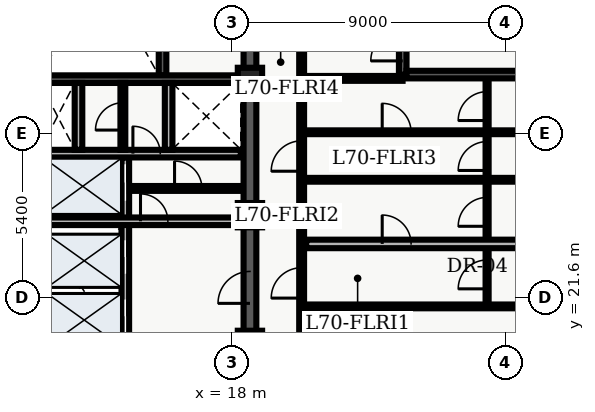
"""IFC4 building model, lengths in metres.
Left out: names, types, materials, properties, quantities, classifications, styles, units other than length and angle.
Written with IfcOpenShell. Run it as: python <this file> out.ifc"""

import sys

from ifc_helpers import new_model, entity, si_unit, converted_unit, direction, frame, origin_with_axes, origin_2d_with_axis, place, context, subcontext, project, spatial, polyline, rectangle, outline, extrude, element, fill, save


model = new_model("IFC4")
c1 = context("Model", 3, precision=1e-05, world=origin_with_axes(), true_north=direction((0.0, 1.0)))
c2 = subcontext(c1, "Body", "Model", "MODEL_VIEW")
j1 = project(units=[si_unit("LENGTHUNIT", "METRE"), converted_unit("PLANEANGLEUNIT", "DEGREE", entity("IfcPlaneAngleMeasure", 0.017), si_unit("PLANEANGLEUNIT", "RADIAN"), dimensions=[0, 0, 0, 0, 0, 0, 0])], contexts=[c1])
p1 = place(None, origin_with_axes())
s1 = spatial("IfcSite", under=j1, at=p1, CompositionType="ELEMENT")
p2 = place(p1, origin_with_axes())
s2 = spatial("IfcBuilding", under=s1, at=p2, CompositionType="ELEMENT")
p3 = place(p2, frame((0.0, 0.0, 284.1), z_axis=(0.0, 0.0, 1.0), x_axis=(1.0, 0.0, 0.0)))
s3 = spatial("IfcBuildingStorey", under=s2, at=p3, CompositionType="ELEMENT", Elevation=284.1)
p4 = place(p3, frame((18.6, 10.8, 0.0), z_axis=(0.0, 0.0, 1.0), x_axis=(0.0, 1.0, 0.0)))
e1 = element("IfcWall", 1, at=p4, inside=s3, PredefinedType="SHEAR", context=c2, shape_type="SweptSolid", body=[
    extrude(outline(polyline([(0.0, -0.21), (13.5, -0.21), (13.5, 0.21), (0.0, 0.21), (0.0, -0.21)])), origin_with_axes(), (0.0, 0.0, 1.0), 3.6),
])
p5 = place(p4, frame((1.3, 0.0, 0.0), z_axis=(0.0, 0.0, 1.0), x_axis=(1.0, 0.0, 0.0)))
e2 = element("IfcOpeningElement", 2, at=p5, cuts=e1, PredefinedType="OPENING", context=c2, shape_type="SweptSolid", body=[
    extrude(rectangle(XDim=1.1, YDim=0.44, at=origin_2d_with_axis()), origin_with_axes(), (0.0, 0.0, 1.0), 2.15),
])
p6 = place(p4, frame((3.4, 0.0, 0.0), z_axis=(0.0, 0.0, 1.0), x_axis=(1.0, 0.0, 0.0)))
e3 = element("IfcOpeningElement", 3, at=p6, cuts=e1, PredefinedType="OPENING", context=c2, shape_type="SweptSolid", body=[
    extrude(rectangle(XDim=1.1, YDim=0.44, at=origin_2d_with_axis()), origin_with_axes(), (0.0, 0.0, 1.0), 2.15),
])
p7 = place(p4, frame((11.125, 0.0, 0.0), z_axis=(0.0, 0.0, 1.0), x_axis=(1.0, 0.0, 0.0)))
e4 = element("IfcOpeningElement", 4, at=p7, cuts=e1, PredefinedType="OPENING", context=c2, shape_type="SweptSolid", body=[
    extrude(rectangle(XDim=1.05, YDim=0.44, at=origin_2d_with_axis()), origin_with_axes(), (0.0, 0.0, 1.0), 2.15),
])
p8 = place(p4, frame((6.675, 0.0, 0.0), z_axis=(0.0, 0.0, 1.0), x_axis=(1.0, 0.0, 0.0)))
e5 = element("IfcOpeningElement", 5, at=p8, cuts=e1, PredefinedType="OPENING", context=c2, shape_type="SweptSolid", body=[
    extrude(rectangle(XDim=0.95, YDim=0.44, at=origin_2d_with_axis()), origin_with_axes(), (0.0, 0.0, 1.0), 2.15),
])
p9 = place(p3, frame((18.6, 24.3, 0.0), z_axis=(0.0, 0.0, 1.0), x_axis=(0.0, 1.0, 0.0)))
e6 = element("IfcWall", 6, at=p9, inside=s3, PredefinedType="SHEAR", context=c2, shape_type="SweptSolid", body=[
    extrude(outline(polyline([(0.0, -0.21), (13.5, -0.21), (13.5, 0.21), (0.0, 0.21), (0.0, -0.21)])), origin_with_axes(), (0.0, 0.0, 1.0), 3.6),
])
p10 = place(p9, frame((6.725, 0.0, 0.0), z_axis=(0.0, 0.0, 1.0), x_axis=(1.0, 0.0, 0.0)))
e7 = element("IfcOpeningElement", 7, at=p10, cuts=e6, PredefinedType="OPENING", context=c2, shape_type="SweptSolid", body=[
    extrude(rectangle(XDim=1.05, YDim=0.44, at=origin_2d_with_axis()), origin_with_axes(), (0.0, 0.0, 1.0), 2.15),
])
p11 = place(p9, frame((11.125, 0.0, 0.0), z_axis=(0.0, 0.0, 1.0), x_axis=(1.0, 0.0, 0.0)))
e8 = element("IfcOpeningElement", 8, at=p11, cuts=e6, PredefinedType="OPENING", context=c2, shape_type="SweptSolid", body=[
    extrude(rectangle(XDim=1.05, YDim=0.44, at=origin_2d_with_axis()), origin_with_axes(), (0.0, 0.0, 1.0), 2.15),
])
p12 = place(p3, frame((15.725, 28.9, 0.0), z_axis=(0.0, 0.0, 1.0), x_axis=(0.0, 1.0, 0.0)))
e9 = element("IfcWall", 9, at=p12, inside=s3, PredefinedType="SHEAR", context=c2, shape_type="SweptSolid", body=[
    extrude(outline(polyline([(0.0, -0.125), (8.69, -0.125), (8.69, 0.125), (0.0, 0.125), (0.0, -0.125)])), origin_with_axes(), (0.0, 0.0, 1.0), 3.6),
])
p13 = place(p3, frame((11.61, 28.775, 0.0), z_axis=(0.0, 0.0, 1.0), x_axis=(1.0, 0.0, 0.0)))
e10 = element("IfcWall", 10, at=p13, inside=s3, PredefinedType="SHEAR", context=c2, shape_type="SweptSolid", body=[
    extrude(outline(polyline([(0.0, -0.125), (6.78, -0.125), (6.78, 0.125), (0.0, 0.125), (0.0, -0.125)])), origin_with_axes(), (0.0, 0.0, 1.0), 3.6),
])
p14 = place(p3, frame((14.5, 19.95, 0.0), z_axis=(0.0, 0.0, 1.0), x_axis=(0.0, 1.0, 0.0)))
e11 = element("IfcWall", 11, at=p14, inside=s3, PredefinedType="SOLIDWALL", context=c2, shape_type="SweptSolid", body=[
    extrude(outline(polyline([(0.0, -0.125), (6.25, -0.125), (6.25, 0.125), (0.0, 0.125), (0.0, -0.125)])), origin_with_axes(), (0.0, 0.0, 1.0), 2.64),
])
p15 = place(p14, frame((1.025, 0.0, 0.0), z_axis=(0.0, 0.0, 1.0), x_axis=(1.0, 0.0, 0.0)))
e12 = element("IfcOpeningElement", 12, at=p15, cuts=e11, PredefinedType="OPENING", context=c2, shape_type="SweptSolid", body=[
    extrude(rectangle(XDim=1.1, YDim=0.27, at=origin_2d_with_axis()), origin_with_axes(), (0.0, 0.0, 1.0), 2.15),
])
p16 = place(p14, frame((2.975, 0.0, 0.0), z_axis=(0.0, 0.0, 1.0), x_axis=(1.0, 0.0, 0.0)))
e13 = element("IfcOpeningElement", 13, at=p16, cuts=e11, PredefinedType="OPENING", context=c2, shape_type="SweptSolid", body=[
    extrude(rectangle(XDim=1.1, YDim=0.27, at=origin_2d_with_axis()), origin_with_axes(), (0.0, 0.0, 1.0), 2.15),
])
p17 = place(p14, frame((5.425, 0.0, 0.0), z_axis=(0.0, 0.0, 1.0), x_axis=(1.0, 0.0, 0.0)))
e14 = element("IfcOpeningElement", 14, at=p17, cuts=e11, PredefinedType="OPENING", context=c2, shape_type="SweptSolid", body=[
    extrude(rectangle(XDim=1.2, YDim=0.27, at=origin_2d_with_axis()), origin_with_axes(), (0.0, 0.0, 1.0), 2.15),
])
p18 = place(p3, frame((11.7, 24.1, 0.0), z_axis=(0.0, 0.0, 1.0), x_axis=(1.0, 0.0, 0.0)))
e15 = element("IfcWall", 15, at=p18, inside=s3, PredefinedType="SOLIDWALL", context=c2, shape_type="SweptSolid", body=[
    extrude(outline(polyline([(0.0, -0.125), (6.6, -0.125), (6.6, 0.125), (0.0, 0.125), (0.0, -0.125)])), origin_with_axes(), (0.0, 0.0, 1.0), 2.64),
])
p19 = place(p18, frame((3.75, 0.0, 0.0), z_axis=(0.0, 0.0, 1.0), x_axis=(1.0, 0.0, 0.0)))
e16 = element("IfcOpeningElement", 16, at=p19, cuts=e15, PredefinedType="OPENING", context=c2, shape_type="SweptSolid", body=[
    extrude(rectangle(XDim=0.9, YDim=0.27, at=origin_2d_with_axis()), origin_with_axes(), (0.0, 0.0, 1.0), 2.15),
])
p20 = place(p3, frame((11.7, 26.325, 0.0), z_axis=(0.0, 0.0, 1.0), x_axis=(1.0, 0.0, 0.0)))
e17 = element("IfcWall", 17, at=p20, inside=s3, PredefinedType="SOLIDWALL", context=c2, shape_type="SweptSolid", body=[
    extrude(outline(polyline([(0.0, -0.125), (6.6, -0.125), (6.6, 0.125), (0.0, 0.125), (0.0, -0.125)])), origin_with_axes(), (0.0, 0.0, 1.0), 2.64),
])
p21 = place(p20, frame((3.5, 0.0, 0.0), z_axis=(0.0, 0.0, 1.0), x_axis=(1.0, 0.0, 0.0)))
e18 = element("IfcOpeningElement", 18, at=p21, cuts=e17, PredefinedType="OPENING", context=c2, shape_type="SweptSolid", body=[
    extrude(rectangle(XDim=0.9, YDim=0.27, at=origin_2d_with_axis()), origin_with_axes(), (0.0, 0.0, 1.0), 2.15),
])
for number, where, z_axis, x_axis in (
    (19, (12.96, 26.45, 0.0), (0.0, 0.0, 1.0), (0.0, 1.0, 0.0)),
    (20, (15.925, 26.45, 0.0), (0.0, 0.0, 1.0), (0.0, 1.0, 0.0)),
):
    element("IfcWall", number, at=place(p3, frame(where, z_axis=z_axis, x_axis=x_axis)), inside=s3, PredefinedType="SOLIDWALL", context=c2, shape_type="SweptSolid", body=[
        extrude(outline(polyline([(0.0, -0.125), (2.2, -0.125), (2.2, 0.125), (0.0, 0.125), (0.0, -0.125)])), origin_with_axes(), (0.0, 0.0, 1.0), 2.64),
    ])
p22 = place(p3, frame((23.625, 28.925, 0.0), z_axis=(0.0, 0.0, 1.0), x_axis=(0.0, 1.0, 0.0)))
e21 = element("IfcWall", 21, at=p22, inside=s3, PredefinedType="SHEAR", context=c2, shape_type="SweptSolid", body=[
    extrude(outline(polyline([(0.0, -0.125), (8.65, -0.125), (8.65, 0.125), (0.0, 0.125), (0.0, -0.125)])), origin_with_axes(), (0.0, 0.0, 1.0), 3.6),
])
p23 = place(p22, frame((0.975, 0.0, 0.0), z_axis=(0.0, 0.0, 1.0), x_axis=(1.0, 0.0, 0.0)))
e22 = element("IfcOpeningElement", 22, at=p23, cuts=e21, PredefinedType="OPENING", context=c2, shape_type="SweptSolid", body=[
    extrude(rectangle(XDim=1.05, YDim=0.27, at=origin_2d_with_axis()), origin_with_axes(), (0.0, 0.0, 1.0), 2.15),
])
p24 = place(p3, frame((23.75, 28.925, 0.0), z_axis=(0.0, 0.0, 1.0), x_axis=(1.0, 0.0, 0.0)))
e23 = element("IfcWall", 23, at=p24, inside=s3, PredefinedType="SHEAR", context=c2, shape_type="SweptSolid", body=[
    extrude(outline(polyline([(0.0, -0.125), (3.9, -0.125), (3.9, 0.125), (0.0, 0.125), (0.0, -0.125)])), origin_with_axes(), (0.0, 0.0, 1.0), 3.6),
])
for number, where, z_axis, x_axis in (
    (24, (18.6, 20.1, 0.0), (0.0, 0.0, 1.0), (1.0, 0.0, 0.0)),
    (25, (18.6, 24.3, 0.0), (0.0, 0.0, 1.0), (1.0, 0.0, 0.0)),
    (26, (18.6, 28.75, 0.0), (0.0, 0.0, 1.0), (1.0, 0.0, 0.0)),
):
    element("IfcColumn", number, at=place(p3, frame(where, z_axis=z_axis, x_axis=x_axis)), inside=s3, PredefinedType="COLUMN", context=c2, shape_type="SweptSolid", body=[
        extrude(rectangle(XDim=0.8, YDim=0.8, at=origin_2d_with_axis()), origin_with_axes(), (0.0, 0.0, 1.0), 3.9),
    ])
p25 = place(p3, frame((14.62, 25.18, 0.0), z_axis=(0.0, 0.0, 1.0), x_axis=(1.0, 0.0, 0.0)))
e27 = element("IfcWall", 27, at=p25, inside=s3, PredefinedType="PARTITIONING", context=c2, shape_type="SweptSolid", body=[
    extrude(outline(polyline([(0.0, -0.08), (3.68, -0.08), (3.68, 0.08), (0.0, 0.08), (0.0, -0.08)])), origin_with_axes(), (0.0, 0.0, 1.0), 2.64),
])
p26 = place(p25, frame((1.95, 0.0, 0.0), z_axis=(0.0, 0.0, 1.0), x_axis=(1.0, 0.0, 0.0)))
e28 = element("IfcOpeningElement", 28, at=p26, cuts=e27, PredefinedType="OPENING", context=c2, shape_type="SweptSolid", body=[
    extrude(rectangle(XDim=0.9, YDim=0.18, at=origin_2d_with_axis()), origin_with_axes(), (0.0, 0.0, 1.0), 2.15),
])
p27 = place(p3, frame((14.42, 26.45, 0.0), z_axis=(0.0, 0.0, 1.0), x_axis=(0.0, 1.0, 0.0)))
e29 = element("IfcWall", 29, at=p27, inside=s3, PredefinedType="PARTITIONING", context=c2, shape_type="SweptSolid", body=[
    extrude(outline(polyline([(0.0, -0.08), (2.2, -0.08), (2.2, 0.08), (0.0, 0.08), (0.0, -0.08)])), origin_with_axes(), (0.0, 0.0, 1.0), 2.64),
])
p28 = place(p27, frame((1.1, 0.0, 0.0), z_axis=(0.0, 0.0, 1.0), x_axis=(1.0, 0.0, 0.0)))
e30 = element("IfcOpeningElement", 30, at=p28, cuts=e29, PredefinedType="OPENING", context=c2, shape_type="SweptSolid", body=[
    extrude(rectangle(XDim=0.9, YDim=0.18, at=origin_2d_with_axis()), origin_with_axes(), (0.0, 0.0, 1.0), 2.15),
])
p29 = place(p3, frame((20.3, 7.8, 0.0), z_axis=(0.0, 0.0, 1.0), x_axis=(0.0, 1.0, 0.0)))
e31 = element("IfcWall", 31, at=p29, inside=s3, PredefinedType="PARTITIONING", context=c2, shape_type="SweptSolid", body=[
    extrude(outline(polyline([(0.0, -0.08), (32.7, -0.08), (32.7, 0.08), (0.0, 0.08), (0.0, -0.08)])), origin_with_axes(), (0.0, 0.0, 1.0), 2.64),
])
p30 = place(p29, frame((25.025, 0.0, 0.0), z_axis=(0.0, 0.0, 1.0), x_axis=(1.0, 0.0, 0.0)))
e32 = element("IfcOpeningElement", 32, at=p30, cuts=e31, PredefinedType="OPENING", context=c2, shape_type="SweptSolid", body=[
    extrude(rectangle(XDim=1.05, YDim=0.18, at=origin_2d_with_axis()), origin_with_axes(), (0.0, 0.0, 1.0), 2.15),
])
p31 = place(p29, frame((14.273, 0.0, 0.0), z_axis=(0.0, 0.0, 1.0), x_axis=(1.0, 0.0, 0.0)))
e33 = element("IfcOpeningElement", 33, at=p31, cuts=e31, PredefinedType="OPENING", context=c2, shape_type="SweptSolid", body=[
    extrude(rectangle(XDim=1.0, YDim=0.18, at=origin_2d_with_axis()), origin_with_axes(), (0.0, 0.0, 1.0), 2.15),
])
p32 = place(p29, frame((18.447, 0.0, 0.0), z_axis=(0.0, 0.0, 1.0), x_axis=(1.0, 0.0, 0.0)))
e34 = element("IfcOpeningElement", 34, at=p32, cuts=e31, PredefinedType="OPENING", context=c2, shape_type="SweptSolid", body=[
    extrude(rectangle(XDim=1.0, YDim=0.18, at=origin_2d_with_axis()), origin_with_axes(), (0.0, 0.0, 1.0), 2.15),
])
p33 = place(p29, frame((6.675, 0.0, 0.0), z_axis=(0.0, 0.0, 1.0), x_axis=(1.0, 0.0, 0.0)))
e35 = element("IfcOpeningElement", 35, at=p33, cuts=e31, PredefinedType="OPENING", context=c2, shape_type="SweptSolid", body=[
    extrude(rectangle(XDim=1.05, YDim=0.18, at=origin_2d_with_axis()), origin_with_axes(), (0.0, 0.0, 1.0), 2.15),
])
p34 = place(p3, frame((20.3, 28.8, 0.0), z_axis=(0.0, 0.0, 1.0), x_axis=(1.0, 0.0, 0.0)))
e36 = element("IfcWall", 36, at=p34, inside=s3, PredefinedType="PARTITIONING", context=c2, shape_type="SweptSolid", body=[
    extrude(outline(polyline([(0.0, -0.08), (3.32, -0.08), (3.32, 0.08), (0.0, 0.08), (0.0, -0.08)])), origin_with_axes(), (0.0, 0.0, 1.0), 2.64),
])
p35 = place(p3, frame((26.4, 21.42, 0.0), z_axis=(0.0, 0.0, 1.0), x_axis=(0.0, 1.0, 0.0)))
e37 = element("IfcWall", 37, at=p35, inside=s3, PredefinedType="PARTITIONING", context=c2, shape_type="SweptSolid", body=[
    extrude(outline(polyline([(0.0, -0.05), (7.26, -0.05), (7.26, 0.05), (0.0, 0.05), (0.0, -0.05)])), origin_with_axes(), (0.0, 0.0, 1.0), 2.64),
])
p36 = place(p35, frame((0.932, 0.0, 0.0), z_axis=(0.0, 0.0, 1.0), x_axis=(1.0, 0.0, 0.0)))
e38 = element("IfcOpeningElement", 38, at=p36, cuts=e37, PredefinedType="OPENING", context=c2, shape_type="SweptSolid", body=[
    extrude(rectangle(XDim=0.95, YDim=0.12, at=origin_2d_with_axis()), origin_with_axes(), (0.0, 0.0, 1.0), 2.15),
])
p37 = place(p35, frame((2.99, 0.0, 0.0), z_axis=(0.0, 0.0, 1.0), x_axis=(1.0, 0.0, 0.0)))
e39 = element("IfcOpeningElement", 39, at=p37, cuts=e37, PredefinedType="OPENING", context=c2, shape_type="SweptSolid", body=[
    extrude(rectangle(XDim=0.95, YDim=0.12, at=origin_2d_with_axis()), origin_with_axes(), (0.0, 0.0, 1.0), 2.15),
])
p38 = place(p35, frame((4.827, 0.0, 0.0), z_axis=(0.0, 0.0, 1.0), x_axis=(1.0, 0.0, 0.0)))
e40 = element("IfcOpeningElement", 40, at=p38, cuts=e37, PredefinedType="OPENING", context=c2, shape_type="SweptSolid", body=[
    extrude(rectangle(XDim=0.95, YDim=0.12, at=origin_2d_with_axis()), origin_with_axes(), (0.0, 0.0, 1.0), 2.15),
])
p39 = place(p35, frame((6.469, 0.0, 0.0), z_axis=(0.0, 0.0, 1.0), x_axis=(1.0, 0.0, 0.0)))
e41 = element("IfcOpeningElement", 41, at=p39, cuts=e37, PredefinedType="OPENING", context=c2, shape_type="SweptSolid", body=[
    extrude(rectangle(XDim=0.95, YDim=0.12, at=origin_2d_with_axis()), origin_with_axes(), (0.0, 0.0, 1.0), 2.15),
])
p40 = place(p3, frame((20.45, 23.355, 0.0), z_axis=(0.0, 0.0, 1.0), x_axis=(1.0, 0.0, 0.0)))
e42 = element("IfcWall", 42, at=p40, inside=s3, PredefinedType="PARTITIONING", context=c2, shape_type="SweptSolid", body=[
    extrude(outline(polyline([(0.0, -0.14), (14.085, -0.14), (14.085, 0.14), (0.0, 0.14), (0.0, -0.14)])), origin_with_axes(), (0.0, 0.0, 1.0), 2.64),
])
p41 = place(p40, frame((2.975, 0.0, 0.0), z_axis=(0.0, 0.0, 1.0), x_axis=(1.0, 0.0, 0.0)))
e43 = element("IfcOpeningElement", 43, at=p41, cuts=e42, PredefinedType="OPENING", context=c2, shape_type="SweptSolid", body=[
    extrude(rectangle(XDim=0.95, YDim=0.3, at=origin_2d_with_axis()), origin_with_axes(), (0.0, 0.0, 1.0), 2.15),
])
p42 = place(p3, frame((20.45, 25.465, 0.0), z_axis=(0.0, 0.0, 1.0), x_axis=(1.0, 0.0, 0.0)))
e44 = element("IfcWall", 44, at=p42, inside=s3, PredefinedType="PARTITIONING", context=c2, shape_type="SweptSolid", body=[
    extrude(outline(polyline([(0.0, -0.062), (14.085, -0.062), (14.085, 0.062), (0.0, 0.062), (0.0, -0.062)])), origin_with_axes(), (0.0, 0.0, 1.0), 2.64),
])
p43 = place(p3, frame((20.45, 27.028, 0.0), z_axis=(0.0, 0.0, 1.0), x_axis=(1.0, 0.0, 0.0)))
e45 = element("IfcWall", 45, at=p43, inside=s3, PredefinedType="PARTITIONING", context=c2, shape_type="SweptSolid", body=[
    extrude(outline(polyline([(0.0, -0.062), (14.085, -0.062), (14.085, 0.062), (0.0, 0.062), (0.0, -0.062)])), origin_with_axes(), (0.0, 0.0, 1.0), 2.64),
])
p44 = place(p43, frame((2.975, 0.0, 0.0), z_axis=(0.0, 0.0, 1.0), x_axis=(1.0, 0.0, 0.0)))
e46 = element("IfcOpeningElement", 46, at=p44, cuts=e45, PredefinedType="OPENING", context=c2, shape_type="SweptSolid", body=[
    extrude(rectangle(XDim=0.95, YDim=0.145, at=origin_2d_with_axis()), origin_with_axes(), (0.0, 0.0, 1.0), 2.15),
])
p45 = place(p3, frame((20.3, 21.3, 0.0), z_axis=(0.0, 0.0, 1.0), x_axis=(1.0, 0.0, 0.0)))
e47 = element("IfcWall", 47, at=p45, inside=s3, PredefinedType="PARTITIONING", context=c2, shape_type="SweptSolid", body=[
    extrude(outline(polyline([(0.0, -0.062), (11.765, -0.062), (11.765, 0.062), (0.0, 0.062), (0.0, -0.062)])), origin_with_axes(), (0.0, 0.0, 1.0), 2.64),
])
p46 = place(p14, frame((1.025, 0.0, 0.0), z_axis=(0.0, 0.0, 1.0), x_axis=(1.0, 0.0, 0.0)))
e48 = element("IfcDoor", 48, at=p46, inside=s3, OperationType="SLIDING_TO_LEFT", PredefinedType="DOOR", context=c2, shape_type="SweptSolid", body=[
    extrude(rectangle(XDim=1.1, YDim=0.09, at=origin_2d_with_axis()), origin_with_axes(), (0.0, 0.0, 1.0), 2.15),
])
fill(e12, e48)
p47 = place(p14, frame((2.975, 0.0, 0.0), z_axis=(0.0, 0.0, 1.0), x_axis=(1.0, 0.0, 0.0)))
e49 = element("IfcDoor", 49, at=p47, inside=s3, OperationType="SLIDING_TO_RIGHT", PredefinedType="DOOR", context=c2, shape_type="SweptSolid", body=[
    extrude(rectangle(XDim=1.1, YDim=0.09, at=origin_2d_with_axis()), origin_with_axes(), (0.0, 0.0, 1.0), 2.15),
])
fill(e13, e49)
p48 = place(p14, frame((5.425, 0.0, 0.0), z_axis=(0.0, 0.0, 1.0), x_axis=(1.0, 0.0, 0.0)))
e50 = element("IfcDoor", 50, at=p48, inside=s3, OperationType="DOUBLE_DOOR_SLIDING", PredefinedType="DOOR", context=c2, shape_type="SweptSolid", body=[
    extrude(rectangle(XDim=1.2, YDim=0.09, at=origin_2d_with_axis()), origin_with_axes(), (0.0, 0.0, 1.0), 2.15),
])
fill(e14, e50)
p49 = place(p4, frame((11.125, 0.0, 0.0), z_axis=(0.0, 0.0, 1.0), x_axis=(1.0, 0.0, 0.0)))
e51 = element("IfcDoor", 51, at=p49, inside=s3, OperationType="SINGLE_SWING_LEFT", PredefinedType="DOOR", context=c2, shape_type="SweptSolid", body=[
    extrude(rectangle(XDim=1.05, YDim=0.09, at=origin_2d_with_axis()), origin_with_axes(), (0.0, 0.0, 1.0), 2.15),
])
fill(e4, e51)
p50 = place(p20, frame((3.5, 0.0, 0.0), z_axis=(0.0, 0.0, 1.0), x_axis=(1.0, 0.0, 0.0)))
e52 = element("IfcDoor", 52, at=p50, inside=s3, OperationType="SINGLE_SWING_LEFT", PredefinedType="DOOR", context=c2, shape_type="SweptSolid", body=[
    extrude(rectangle(XDim=0.9, YDim=0.09, at=origin_2d_with_axis()), origin_with_axes(), (0.0, 0.0, 1.0), 2.15),
])
fill(e18, e52)
p51 = place(p27, frame((1.1, 0.0, 0.0), z_axis=(0.0, 0.0, 1.0), x_axis=(1.0, 0.0, 0.0)))
e53 = element("IfcDoor", 53, at=p51, inside=s3, OperationType="SINGLE_SWING_LEFT", PredefinedType="DOOR", context=c2, shape_type="SweptSolid", body=[
    extrude(rectangle(XDim=0.9, YDim=0.09, at=origin_2d_with_axis()), origin_with_axes(), (0.0, 0.0, 1.0), 2.15),
])
fill(e30, e53)
p52 = place(p18, frame((3.75, 0.0, 0.0), z_axis=(0.0, 0.0, 1.0), x_axis=(1.0, 0.0, 0.0)))
e54 = element("IfcDoor", 54, at=p52, inside=s3, OperationType="SINGLE_SWING_LEFT", PredefinedType="DOOR", context=c2, shape_type="SweptSolid", body=[
    extrude(rectangle(XDim=0.9, YDim=0.09, at=origin_2d_with_axis()), origin_with_axes(), (0.0, 0.0, 1.0), 2.15),
])
fill(e16, e54)
p53 = place(p25, frame((1.95, 0.0, 0.0), z_axis=(0.0, 0.0, 1.0), x_axis=(1.0, 0.0, 0.0)))
e55 = element("IfcDoor", 55, at=p53, inside=s3, OperationType="SINGLE_SWING_LEFT", PredefinedType="DOOR", context=c2, shape_type="SweptSolid", body=[
    extrude(rectangle(XDim=0.9, YDim=0.09, at=origin_2d_with_axis()), origin_with_axes(), (0.0, 0.0, 1.0), 2.15),
])
fill(e28, e55)
p54 = place(p22, frame((0.975, 0.0, 0.0), z_axis=(0.0, 0.0, 1.0), x_axis=(1.0, 0.0, 0.0)))
e56 = element("IfcDoor", 56, at=p54, inside=s3, OperationType="SINGLE_SWING_LEFT", PredefinedType="DOOR", context=c2, shape_type="SweptSolid", body=[
    extrude(rectangle(XDim=1.05, YDim=0.09, at=origin_2d_with_axis()), origin_with_axes(), (0.0, 0.0, 1.0), 2.15),
])
fill(e22, e56)
p55 = place(p35, frame((0.932, 0.0, 0.0), z_axis=(0.0, 0.0, 1.0), x_axis=(1.0, 0.0, 0.0)))
e57 = element("IfcDoor", 57, at=p55, inside=s3, OperationType="SINGLE_SWING_LEFT", PredefinedType="DOOR", context=c2, shape_type="SweptSolid", body=[
    extrude(rectangle(XDim=0.95, YDim=0.06, at=origin_2d_with_axis()), origin_with_axes(), (0.0, 0.0, 1.0), 2.15),
])
fill(e38, e57)
p56 = place(p29, frame((14.273, 0.0, 0.0), z_axis=(0.0, 0.0, 1.0), x_axis=(1.0, 0.0, 0.0)))
e58 = element("IfcDoor", 58, at=p56, inside=s3, OperationType="SINGLE_SWING_LEFT", PredefinedType="DOOR", context=c2, shape_type="SweptSolid", body=[
    extrude(rectangle(XDim=1.0, YDim=0.09, at=origin_2d_with_axis()), origin_with_axes(), (0.0, 0.0, 1.0), 2.15),
])
fill(e33, e58)
p57 = place(p35, frame((2.99, 0.0, 0.0), z_axis=(0.0, 0.0, 1.0), x_axis=(1.0, 0.0, 0.0)))
e59 = element("IfcDoor", 59, at=p57, inside=s3, OperationType="SINGLE_SWING_LEFT", PredefinedType="DOOR", context=c2, shape_type="SweptSolid", body=[
    extrude(rectangle(XDim=0.95, YDim=0.06, at=origin_2d_with_axis()), origin_with_axes(), (0.0, 0.0, 1.0), 2.15),
])
fill(e39, e59)
p58 = place(p40, frame((2.975, 0.0, 0.0), z_axis=(0.0, 0.0, 1.0), x_axis=(1.0, 0.0, 0.0)))
e60 = element("IfcDoor", 60, at=p58, inside=s3, OperationType="SINGLE_SWING_LEFT", PredefinedType="DOOR", context=c2, shape_type="SweptSolid", body=[
    extrude(rectangle(XDim=0.95, YDim=0.09, at=origin_2d_with_axis()), origin_with_axes(), (0.0, 0.0, 1.0), 2.15),
])
fill(e43, e60)
p59 = place(p35, frame((4.827, 0.0, 0.0), z_axis=(0.0, 0.0, 1.0), x_axis=(1.0, 0.0, 0.0)))
e61 = element("IfcDoor", 61, at=p59, inside=s3, OperationType="SINGLE_SWING_LEFT", PredefinedType="DOOR", context=c2, shape_type="SweptSolid", body=[
    extrude(rectangle(XDim=0.95, YDim=0.06, at=origin_2d_with_axis()), origin_with_axes(), (0.0, 0.0, 1.0), 2.15),
])
fill(e40, e61)
p60 = place(p29, frame((18.447, 0.0, 0.0), z_axis=(0.0, 0.0, 1.0), x_axis=(1.0, 0.0, 0.0)))
e62 = element("IfcDoor", 62, at=p60, inside=s3, OperationType="SINGLE_SWING_LEFT", PredefinedType="DOOR", context=c2, shape_type="SweptSolid", body=[
    extrude(rectangle(XDim=1.0, YDim=0.09, at=origin_2d_with_axis()), origin_with_axes(), (0.0, 0.0, 1.0), 2.15),
])
fill(e34, e62)
p61 = place(p35, frame((6.469, 0.0, 0.0), z_axis=(0.0, 0.0, 1.0), x_axis=(1.0, 0.0, 0.0)))
e63 = element("IfcDoor", 63, at=p61, inside=s3, OperationType="SINGLE_SWING_LEFT", PredefinedType="DOOR", context=c2, shape_type="SweptSolid", body=[
    extrude(rectangle(XDim=0.95, YDim=0.06, at=origin_2d_with_axis()), origin_with_axes(), (0.0, 0.0, 1.0), 2.15),
])
fill(e41, e63)
p62 = place(p43, frame((2.975, 0.0, 0.0), z_axis=(0.0, 0.0, 1.0), x_axis=(1.0, 0.0, 0.0)))
e64 = element("IfcDoor", 64, at=p62, inside=s3, OperationType="SINGLE_SWING_LEFT", PredefinedType="DOOR", context=c2, shape_type="SweptSolid", body=[
    extrude(rectangle(XDim=0.95, YDim=0.075, at=origin_2d_with_axis()), origin_with_axes(), (0.0, 0.0, 1.0), 2.15),
])
fill(e46, e64)
save(model, sys.argv[1])
